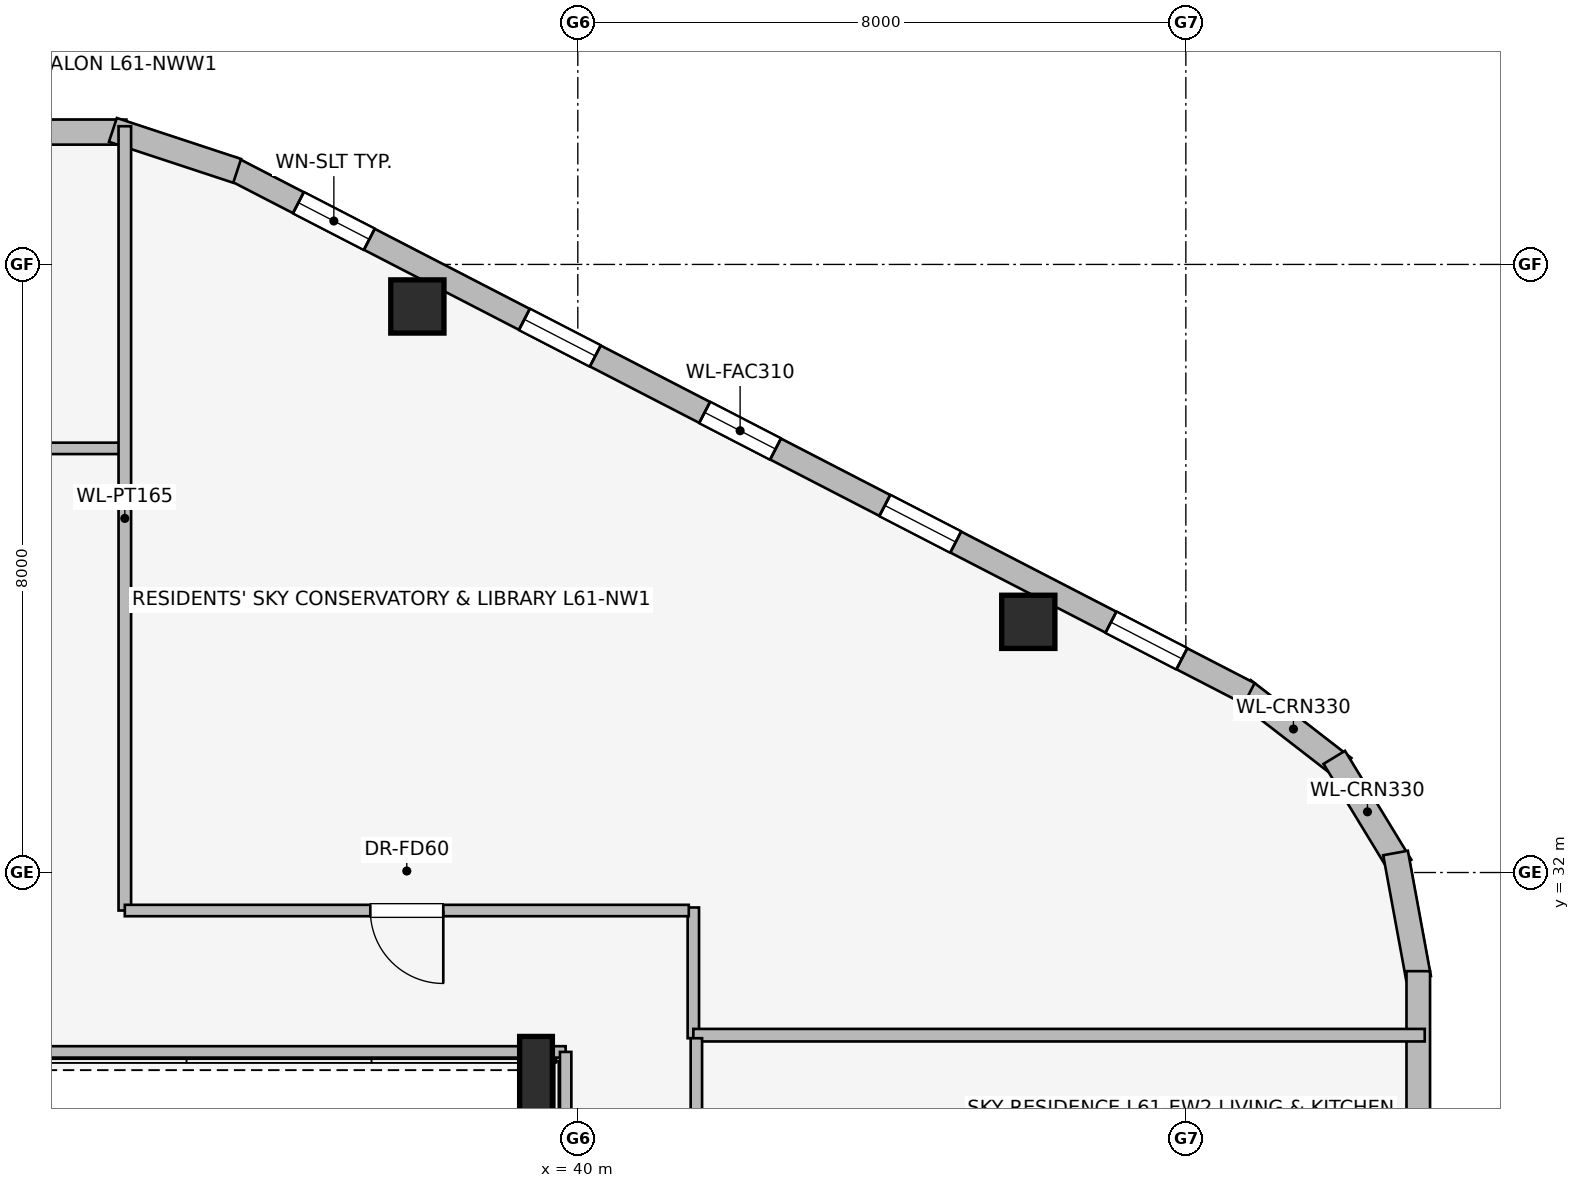
"""IFC4 building model, lengths in metres.
Left out: names, types, materials, properties, quantities, classifications, styles, units other than length and angle.
Written with IfcOpenShell. Run it as: python <this file> out.ifc"""

import sys

from ifc_helpers import new_model, si_unit, direction, frame, frame_2d, origin, origin_2d, place, context, subcontext, project, spatial, rectangle, i_section, extrude, element, fill, save


model = new_model("IFC4")
c1 = context("Model", 3, precision=1e-05, world=origin(), true_north=direction((0.0, 1.0)))
c2 = subcontext(c1, "Body", "Model", "MODEL_VIEW")
j1 = project(units=[si_unit("LENGTHUNIT", "METRE"), si_unit("PLANEANGLEUNIT", "RADIAN")], contexts=[c1])
p1 = place(None, origin())
s1 = spatial("IfcSite", under=j1, at=p1, CompositionType="ELEMENT")
p2 = place(p1, origin())
s2 = spatial("IfcBuilding", under=s1, at=p2, CompositionType="ELEMENT")
p3 = place(p2, frame((0.0, 0.0, 224.15)))
s3 = spatial("IfcBuildingStorey", under=s2, at=p3, CompositionType="ELEMENT", Elevation=224.15)
for number, where, z_axis, x_axis in (
    (1, (45.927, 35.298, 0.0), (0.0, 0.0, 1.0), (1.0, 0.0, 0.0)),
    (2, (37.889, 39.447, 0.0), (0.0, 0.0, 1.0), (1.0, 0.0, 0.0)),
):
    element("IfcColumn", number, at=place(p3, frame(where, z_axis=z_axis, x_axis=x_axis)), inside=s3, PredefinedType="COLUMN", context=c2, shape_type="SweptSolid", body=[
        extrude(rectangle(XDim=0.7, YDim=0.7, at=origin_2d()), origin(), (0.0, 0.0, 1.0), 3.55),
    ])
p4 = place(p3, frame((39.45, 29.35, 0.0), z_axis=(0.0, 0.0, 1.0), x_axis=(1.0, 0.0, 0.0)))
e3 = element("IfcColumn", 3, at=p4, inside=s3, PredefinedType="COLUMN", context=c2, shape_type="SweptSolid", body=[
    extrude(i_section(OverallWidth=0.431, OverallDepth=0.987, WebThickness=0.034, FlangeThickness=0.062, at=origin_2d()), origin(), (0.0, 0.0, 1.0), 3.55),
])
p5 = place(p3, frame((48.753, 34.401, 0.0), z_axis=(0.0, 0.0, 1.0), x_axis=(0.790691856293, -0.61221433207, 0.0)))
e4 = element("IfcWall", 4, at=p5, inside=s3, PredefinedType="STANDARD", context=c2, shape_type="SweptSolid", body=[
    extrude(rectangle(XDim=1.676, YDim=0.33, at=frame_2d((0.838, 0.0))), origin(), (0.0, 0.0, 1.0), 3.29),
])
p6 = place(p3, frame((49.953, 33.515, 0.0), z_axis=(0.0, 0.0, 1.0), x_axis=(0.520325409202, -0.853968072318, 0.0)))
e5 = element("IfcWall", 5, at=p6, inside=s3, PredefinedType="STANDARD", context=c2, shape_type="SweptSolid", body=[
    extrude(rectangle(XDim=1.678, YDim=0.33, at=frame_2d((0.839, 0.0))), origin(), (0.0, 0.0, 1.0), 3.29),
])
p7 = place(p3, frame((50.759, 32.257, 0.0), z_axis=(0.0, 0.0, 1.0), x_axis=(0.180691763044, -0.983539773862, 0.0)))
e6 = element("IfcWall", 6, at=p7, inside=s3, PredefinedType="STANDARD", context=c2, shape_type="SweptSolid", body=[
    extrude(rectangle(XDim=1.677, YDim=0.33, at=frame_2d((0.838, 0.0))), origin(), (0.0, 0.0, 1.0), 3.29),
])
p8 = place(p3, frame((35.437, 41.27, 0.0), z_axis=(0.0, 0.0, 1.0), x_axis=(0.888581481622, -0.458718814218, 0.0)))
e7 = element("IfcWall", 7, at=p8, inside=s3, PredefinedType="STANDARD", context=c2, shape_type="SweptSolid", body=[
    extrude(rectangle(XDim=15.077, YDim=0.31, at=frame_2d((7.539, 0.0))), origin(), (0.0, 0.0, 1.0), 3.29),
])
p9 = place(p8, frame((0.998, 0.0, 0.75)))
e8 = element("IfcOpeningElement", 8, at=p9, cuts=e7, PredefinedType="OPENING", context=c2, shape_type="SweptSolid", body=[
    extrude(rectangle(XDim=1.05, YDim=1.4, at=frame_2d((0.525, 0.7))), frame((0.0, 0.165, 0.0), z_axis=(0.0, -1.0, 0.0), x_axis=(1.0, 0.0, 0.0)), (0.0, 0.0, 1.0), 0.33),
])
p10 = place(p8, frame((4.344, 0.0, 0.75)))
e9 = element("IfcOpeningElement", 9, at=p10, cuts=e7, PredefinedType="OPENING", context=c2, shape_type="SweptSolid", body=[
    extrude(rectangle(XDim=1.05, YDim=1.4, at=frame_2d((0.525, 0.7))), frame((0.0, 0.165, 0.0), z_axis=(0.0, -1.0, 0.0), x_axis=(1.0, 0.0, 0.0)), (0.0, 0.0, 1.0), 0.33),
])
p11 = place(p8, frame((7.013, 0.0, 0.75)))
e10 = element("IfcOpeningElement", 10, at=p11, cuts=e7, PredefinedType="OPENING", context=c2, shape_type="SweptSolid", body=[
    extrude(rectangle(XDim=1.05, YDim=1.4, at=frame_2d((0.525, 0.7))), frame((0.0, 0.165, 0.0), z_axis=(0.0, -1.0, 0.0), x_axis=(1.0, 0.0, 0.0)), (0.0, 0.0, 1.0), 0.33),
])
p12 = place(p8, frame((9.681, 0.0, 0.75)))
e11 = element("IfcOpeningElement", 11, at=p12, cuts=e7, PredefinedType="OPENING", context=c2, shape_type="SweptSolid", body=[
    extrude(rectangle(XDim=1.05, YDim=1.4, at=frame_2d((0.525, 0.7))), frame((0.0, 0.165, 0.0), z_axis=(0.0, -1.0, 0.0), x_axis=(1.0, 0.0, 0.0)), (0.0, 0.0, 1.0), 0.33),
])
p13 = place(p8, frame((13.029, 0.0, 0.75)))
e12 = element("IfcOpeningElement", 12, at=p13, cuts=e7, PredefinedType="OPENING", context=c2, shape_type="SweptSolid", body=[
    extrude(rectangle(XDim=1.05, YDim=1.4, at=frame_2d((0.525, 0.7))), frame((0.0, 0.165, 0.0), z_axis=(0.0, -1.0, 0.0), x_axis=(1.0, 0.0, 0.0)), (0.0, 0.0, 1.0), 0.33),
])
p14 = place(p3, frame((32.339, 41.741, 0.0), z_axis=(0.0, 0.0, 1.0), x_axis=(1.0, 0.0, 0.0)))
e13 = element("IfcWall", 13, at=p14, inside=s3, PredefinedType="STANDARD", context=c2, shape_type="SweptSolid", body=[
    extrude(rectangle(XDim=1.722, YDim=0.33, at=frame_2d((0.861, 0.0))), origin(), (0.0, 0.0, 1.0), 3.29),
])
p15 = place(p3, frame((33.883, 41.77, 0.0), z_axis=(0.0, 0.0, 1.0), x_axis=(0.949713440491, -0.313120393699, 0.0)))
e14 = element("IfcWall", 14, at=p15, inside=s3, PredefinedType="STANDARD", context=c2, shape_type="SweptSolid", body=[
    extrude(rectangle(XDim=1.722, YDim=0.33, at=frame_2d((0.861, 0.0))), origin(), (0.0, 0.0, 1.0), 3.29),
])
p16 = place(p3, frame((51.058, 30.702, 0.0), z_axis=(0.0, 0.0, 1.0), x_axis=(0.0, -1.0, 0.0)))
e15 = element("IfcWall", 15, at=p16, inside=s3, PredefinedType="STANDARD", context=c2, shape_type="SweptSolid", body=[
    extrude(rectangle(XDim=13.404, YDim=0.31, at=frame_2d((6.702, 0.0))), origin(), (0.0, 0.0, 1.0), 3.29),
])
p17 = place(p16, frame((4.706, 0.0, 0.75)))
e16 = element("IfcOpeningElement", 16, at=p17, cuts=e15, PredefinedType="OPENING", context=c2, shape_type="SweptSolid", body=[
    extrude(rectangle(XDim=2.4, YDim=1.6, at=frame_2d((1.2, 0.8))), frame((0.0, 0.165, 0.0), z_axis=(0.0, -1.0, 0.0), x_axis=(1.0, 0.0, 0.0)), (0.0, 0.0, 1.0), 0.33),
])
p18 = place(p16, frame((8.807, 0.0, 0.75)))
e17 = element("IfcOpeningElement", 17, at=p18, cuts=e15, PredefinedType="OPENING", context=c2, shape_type="SweptSolid", body=[
    extrude(rectangle(XDim=1.05, YDim=1.4, at=frame_2d((0.525, 0.7))), frame((0.0, 0.165, 0.0), z_axis=(0.0, -1.0, 0.0), x_axis=(1.0, 0.0, 0.0)), (0.0, 0.0, 1.0), 0.33),
])
p19 = place(p3, frame((39.84, 29.64, 0.0), z_axis=(0.0, 0.0, 1.0), x_axis=(-1.0, 0.0, 0.0)))
e18 = element("IfcWall", 18, at=p19, inside=s3, PredefinedType="PARTITIONING", context=c2, shape_type="SweptSolid", body=[
    extrude(rectangle(XDim=12.203, YDim=0.15, at=frame_2d((6.102, 0.0))), origin(), (0.0, 0.0, 1.0), 2.431),
])
p20 = place(p3, frame((39.84, 18.36, 0.0), z_axis=(0.0, 0.0, 1.0), x_axis=(0.0, 1.0, 0.0)))
e19 = element("IfcWall", 19, at=p20, inside=s3, PredefinedType="PARTITIONING", context=c2, shape_type="SweptSolid", body=[
    extrude(rectangle(XDim=11.28, YDim=0.15, at=frame_2d((5.64, 0.0))), origin(), (0.0, 0.0, 1.0), 3.29),
])
p21 = place(p3, frame((34.0, 37.58, 0.0), z_axis=(0.0, 0.0, 1.0), x_axis=(-1.0, 0.0, 0.0)))
e20 = element("IfcWall", 20, at=p21, inside=s3, PredefinedType="PARTITIONING", context=c2, shape_type="SweptSolid", body=[
    extrude(rectangle(XDim=10.501, YDim=0.15, at=frame_2d((5.25, 0.0))), origin(), (0.0, 0.0, 1.0), 2.682),
])
p22 = place(p21, frame((4.879, 0.0, 0.0)))
e21 = element("IfcOpeningElement", 21, at=p22, cuts=e20, PredefinedType="OPENING", context=c2, shape_type="SweptSolid", body=[
    extrude(rectangle(XDim=0.96, YDim=2.0, at=frame_2d((0.48, 1.0))), frame((0.0, 0.085, 0.0), z_axis=(0.0, -1.0, 0.0), x_axis=(1.0, 0.0, 0.0)), (0.0, 0.0, 1.0), 0.17),
])
p23 = place(p3, frame((34.04, 31.5, 0.0), z_axis=(0.0, 0.0, 1.0), x_axis=(0.0, 1.0, 0.0)))
e22 = element("IfcWall", 22, at=p23, inside=s3, PredefinedType="PARTITIONING", context=c2, shape_type="SweptSolid", body=[
    extrude(rectangle(XDim=10.318, YDim=0.165, at=frame_2d((5.159, 0.0))), origin(), (0.0, 0.0, 1.0), 3.29),
])
p24 = place(p3, frame((41.52, 29.82, 0.0), z_axis=(0.0, 0.0, 1.0), x_axis=(0.0, 1.0, 0.0)))
e23 = element("IfcWall", 23, at=p24, inside=s3, PredefinedType="PARTITIONING", context=c2, shape_type="SweptSolid", body=[
    extrude(rectangle(XDim=1.72, YDim=0.15, at=frame_2d((0.86, 0.0))), origin(), (0.0, 0.0, 1.0), 3.29),
])
p25 = place(p3, frame((41.46, 31.5, 0.0), z_axis=(0.0, 0.0, 1.0), x_axis=(-1.0, 0.0, 0.0)))
e24 = element("IfcWall", 24, at=p25, inside=s3, PredefinedType="PARTITIONING", context=c2, shape_type="SweptSolid", body=[
    extrude(rectangle(XDim=7.42, YDim=0.15, at=frame_2d((3.71, 0.0))), origin(), (0.0, 0.0, 1.0), 3.29),
])
p26 = place(p25, frame((3.23, 0.0, 0.0)))
e25 = element("IfcOpeningElement", 25, at=p26, cuts=e24, PredefinedType="OPENING", context=c2, shape_type="SweptSolid", body=[
    extrude(rectangle(XDim=0.96, YDim=2.0, at=frame_2d((0.48, 1.0))), frame((0.0, 0.085, 0.0), z_axis=(0.0, -1.0, 0.0), x_axis=(1.0, 0.0, 0.0)), (0.0, 0.0, 1.0), 0.17),
])
p27 = place(p3, frame((41.52, 29.86, 0.0), z_axis=(0.0, 0.0, 1.0), x_axis=(1.0, 0.0, 0.0)))
e26 = element("IfcWall", 26, at=p27, inside=s3, PredefinedType="PARTITIONING", context=c2, shape_type="SweptSolid", body=[
    extrude(rectangle(XDim=9.623, YDim=0.165, at=frame_2d((4.812, 0.0))), origin(), (0.0, 0.0, 1.0), 3.29),
])
p28 = place(p3, frame((41.56, 22.621, 0.0), z_axis=(0.0, 0.0, 1.0), x_axis=(0.0, 1.0, 0.0)))
e27 = element("IfcWall", 27, at=p28, inside=s3, PredefinedType="PARTITIONING", context=c2, shape_type="SweptSolid", body=[
    extrude(rectangle(XDim=7.199, YDim=0.15, at=frame_2d((3.6, 0.0))), origin(), (0.0, 0.0, 1.0), 3.29),
])
p29 = place(p28, frame((4.37, 0.0, 0.0)))
e28 = element("IfcOpeningElement", 28, at=p29, cuts=e27, PredefinedType="OPENING", context=c2, shape_type="SweptSolid", body=[
    extrude(rectangle(XDim=0.96, YDim=2.0, at=frame_2d((0.48, 1.0))), frame((0.0, 0.085, 0.0), z_axis=(0.0, -1.0, 0.0), x_axis=(1.0, 0.0, 0.0)), (0.0, 0.0, 1.0), 0.17),
])
p30 = place(p9, origin())
e29 = element("IfcWindow", 29, at=p30, inside=s3, PartitioningType="SINGLE_PANEL", PredefinedType="WINDOW", context=c2, shape_type="SweptSolid", body=[
    extrude(rectangle(XDim=1.05, YDim=1.4, at=frame_2d((0.525, 0.7))), frame((0.0, 0.03, 0.0), z_axis=(0.0, -1.0, 0.0), x_axis=(1.0, 0.0, 0.0)), (0.0, 0.0, 1.0), 0.06),
])
fill(e8, e29)
p31 = place(p10, origin())
e30 = element("IfcWindow", 30, at=p31, inside=s3, PartitioningType="SINGLE_PANEL", PredefinedType="WINDOW", context=c2, shape_type="SweptSolid", body=[
    extrude(rectangle(XDim=1.05, YDim=1.4, at=frame_2d((0.525, 0.7))), frame((0.0, 0.03, 0.0), z_axis=(0.0, -1.0, 0.0), x_axis=(1.0, 0.0, 0.0)), (0.0, 0.0, 1.0), 0.06),
])
fill(e9, e30)
p32 = place(p11, origin())
e31 = element("IfcWindow", 31, at=p32, inside=s3, PartitioningType="SINGLE_PANEL", PredefinedType="WINDOW", context=c2, shape_type="SweptSolid", body=[
    extrude(rectangle(XDim=1.05, YDim=1.4, at=frame_2d((0.525, 0.7))), frame((0.0, 0.03, 0.0), z_axis=(0.0, -1.0, 0.0), x_axis=(1.0, 0.0, 0.0)), (0.0, 0.0, 1.0), 0.06),
])
fill(e10, e31)
p33 = place(p12, origin())
e32 = element("IfcWindow", 32, at=p33, inside=s3, PartitioningType="SINGLE_PANEL", PredefinedType="WINDOW", context=c2, shape_type="SweptSolid", body=[
    extrude(rectangle(XDim=1.05, YDim=1.4, at=frame_2d((0.525, 0.7))), frame((0.0, 0.03, 0.0), z_axis=(0.0, -1.0, 0.0), x_axis=(1.0, 0.0, 0.0)), (0.0, 0.0, 1.0), 0.06),
])
fill(e11, e32)
p34 = place(p13, origin())
e33 = element("IfcWindow", 33, at=p34, inside=s3, PartitioningType="SINGLE_PANEL", PredefinedType="WINDOW", context=c2, shape_type="SweptSolid", body=[
    extrude(rectangle(XDim=1.05, YDim=1.4, at=frame_2d((0.525, 0.7))), frame((0.0, 0.03, 0.0), z_axis=(0.0, -1.0, 0.0), x_axis=(1.0, 0.0, 0.0)), (0.0, 0.0, 1.0), 0.06),
])
fill(e12, e33)
p35 = place(p26, origin())
e34 = element("IfcDoor", 34, at=p35, inside=s3, OperationType="SINGLE_SWING_LEFT", PredefinedType="DOOR", context=c2, shape_type="SweptSolid", body=[
    extrude(rectangle(XDim=0.96, YDim=2.0, at=frame_2d((0.48, 1.0))), frame((0.0, 0.025, 0.0), z_axis=(0.0, -1.0, 0.0), x_axis=(1.0, 0.0, 0.0)), (0.0, 0.0, 1.0), 0.05),
])
fill(e25, e34)
save(model, sys.argv[1])
